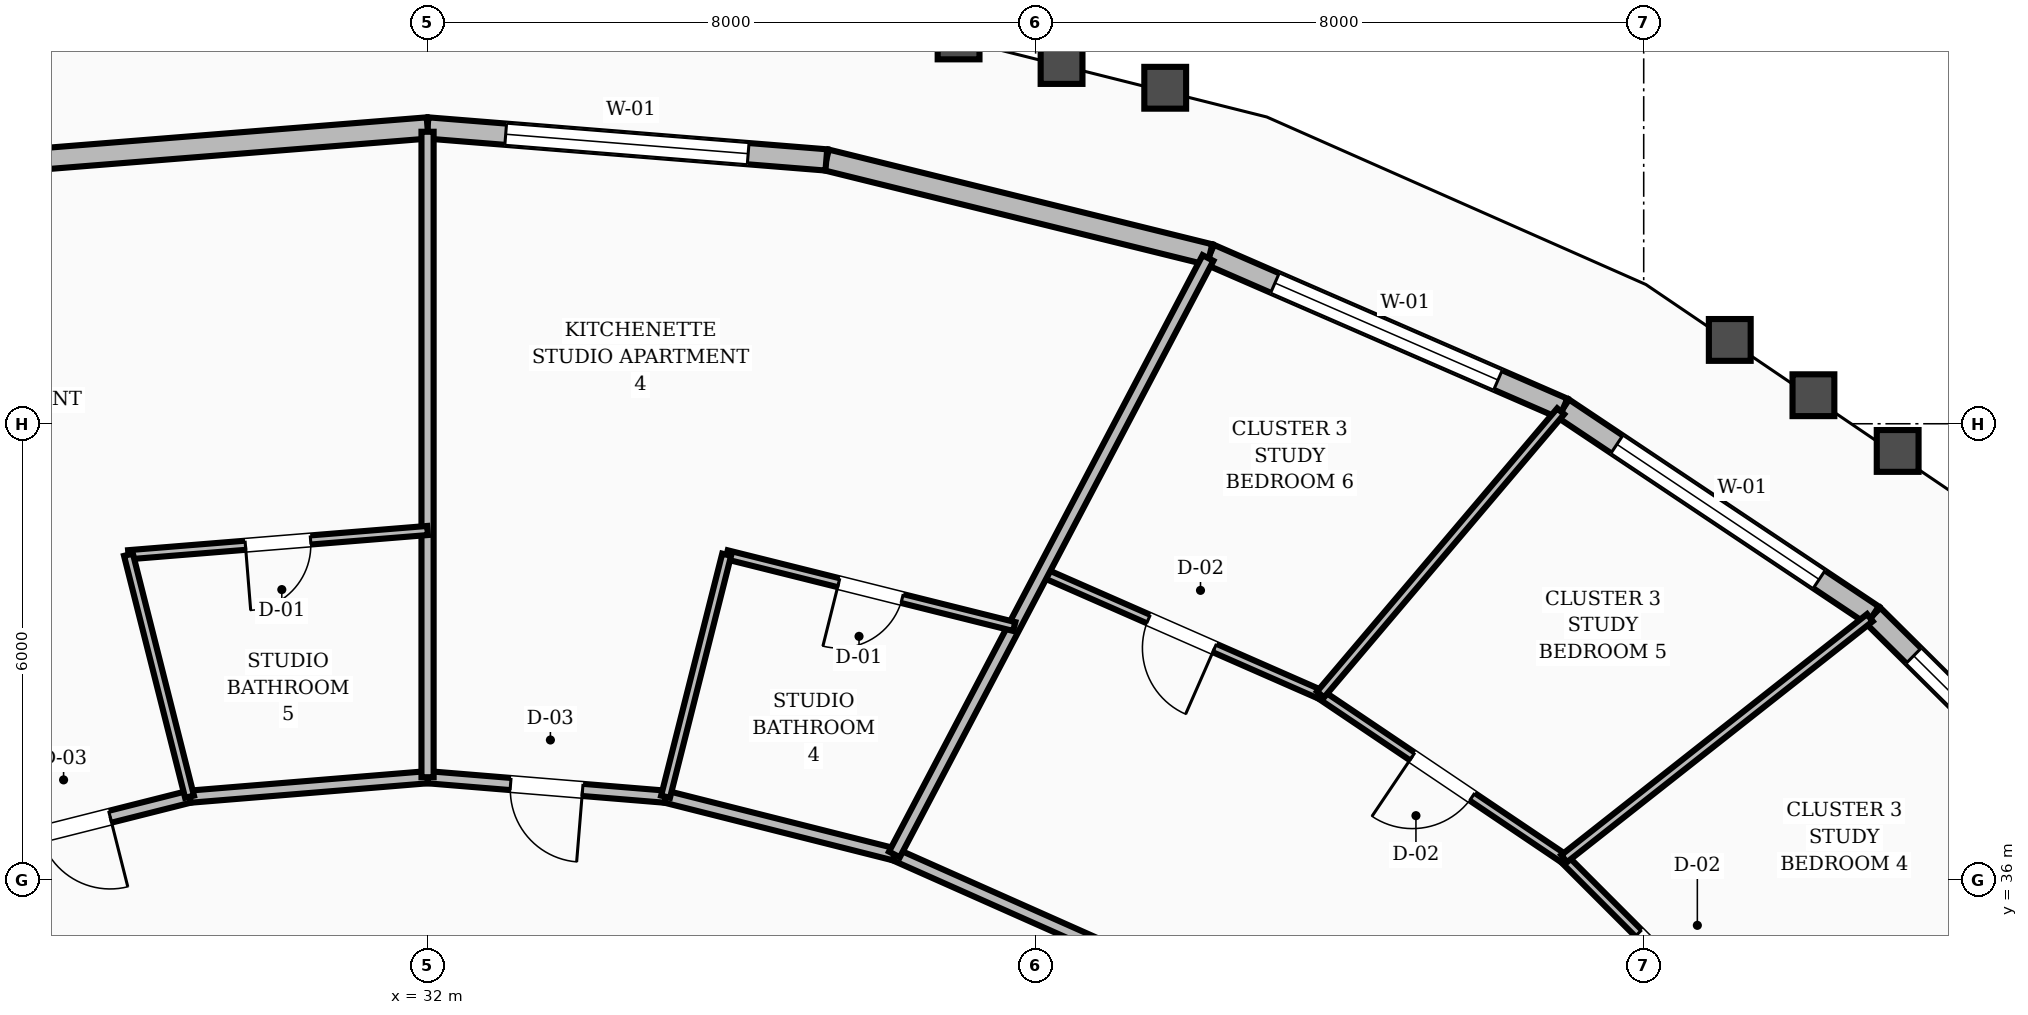
"""IFC4 building model, lengths in metres.
Left out: names, types, materials, properties, quantities, classifications, styles, units other than length and angle.
Written with IfcOpenShell. Run it as: python <this file> out.ifc"""

import sys

from ifc_helpers import new_model, si_unit, direction, frame, frame_2d, origin, place, context, subcontext, project, spatial, rectangle, extrude, element, fill, save


model = new_model("IFC4")
c1 = context("Model", 3, precision=1e-05, world=origin(), true_north=direction((0.0, 1.0)))
c2 = subcontext(c1, "Body", "Model", "MODEL_VIEW")
j1 = project(units=[si_unit("LENGTHUNIT", "METRE"), si_unit("PLANEANGLEUNIT", "RADIAN")], contexts=[c1])
p1 = place(None, origin())
s1 = spatial("IfcSite", under=j1, at=p1, CompositionType="ELEMENT")
p2 = place(p1, origin())
s2 = spatial("IfcBuilding", under=s1, at=p2, CompositionType="ELEMENT")
p3 = place(p2, frame((0.0, 0.0, 66.4)))
s3 = spatial("IfcBuildingStorey", under=s2, at=p3, CompositionType="ELEMENT", Elevation=66.4)
p4 = place(p3, frame((54.36, 36.162, 0.0), z_axis=(0.0, 0.0, 1.0), x_axis=(-0.710003239363, 0.704198409608, 0.0)))
e1 = element("IfcWall", 1, at=p4, inside=s3, PredefinedType="STANDARD", context=c2, shape_type="SweptSolid", body=[
    extrude(rectangle(XDim=4.71, YDim=0.28, at=frame_2d((2.355, 0.0))), origin(), (0.0, 0.0, 1.0), 2.71),
])
p5 = place(p4, frame((0.755, 0.0, 0.8)))
e2 = element("IfcOpeningElement", 2, at=p5, cuts=e1, PredefinedType="OPENING", context=c2, shape_type="SweptSolid", body=[
    extrude(rectangle(XDim=3.2, YDim=1.65, at=frame_2d((1.6, 0.825))), frame((0.0, 0.15, 0.0), z_axis=(0.0, -1.0, 0.0), x_axis=(1.0, 0.0, 0.0)), (0.0, 0.0, 1.0), 0.3),
])
p6 = place(p3, frame((51.015, 39.479, 0.0), z_axis=(0.0, 0.0, 1.0), x_axis=(-0.83148272081, 0.555550614251, 0.0)))
e3 = element("IfcWall", 3, at=p6, inside=s3, PredefinedType="STANDARD", context=c2, shape_type="SweptSolid", body=[
    extrude(rectangle(XDim=4.901, YDim=0.28, at=frame_2d((2.45, 0.0))), origin(), (0.0, 0.0, 1.0), 2.71),
])
p7 = place(p6, frame((0.85, 0.0, 0.8)))
e4 = element("IfcOpeningElement", 4, at=p7, cuts=e3, PredefinedType="OPENING", context=c2, shape_type="SweptSolid", body=[
    extrude(rectangle(XDim=3.2, YDim=1.65, at=frame_2d((1.6, 0.825))), frame((0.0, 0.15, 0.0), z_axis=(0.0, -1.0, 0.0), x_axis=(1.0, 0.0, 0.0)), (0.0, 0.0, 1.0), 0.3),
])
p8 = place(p3, frame((46.94, 42.202, 0.0), z_axis=(0.0, 0.0, 1.0), x_axis=(-0.916956720631, 0.398986682096, 0.0)))
e5 = element("IfcWall", 5, at=p8, inside=s3, PredefinedType="STANDARD", context=c2, shape_type="SweptSolid", body=[
    extrude(rectangle(XDim=5.07, YDim=0.28, at=frame_2d((2.535, 0.0))), origin(), (0.0, 0.0, 1.0), 2.71),
])
p9 = place(p8, frame((0.935, 0.0, 0.8)))
e6 = element("IfcOpeningElement", 6, at=p9, cuts=e5, PredefinedType="OPENING", context=c2, shape_type="SweptSolid", body=[
    extrude(rectangle(XDim=3.2, YDim=1.65, at=frame_2d((1.6, 0.825))), frame((0.0, 0.15, 0.0), z_axis=(0.0, -1.0, 0.0), x_axis=(1.0, 0.0, 0.0)), (0.0, 0.0, 1.0), 0.3),
])
p10 = place(p3, frame((42.291, 44.225, 0.0), z_axis=(0.0, 0.0, 1.0), x_axis=(-0.970832238087, 0.239759807915, 0.0)))
e7 = element("IfcWall", 7, at=p10, inside=s3, PredefinedType="STANDARD", context=c2, shape_type="SweptSolid", body=[
    extrude(rectangle(XDim=5.196, YDim=0.28, at=frame_2d((2.598, 0.0))), origin(), (0.0, 0.0, 1.0), 2.71),
])
p11 = place(p3, frame((37.246, 45.471, 0.0), z_axis=(0.0, 0.0, 1.0), x_axis=(-0.996800955667, 0.079924056336, 0.0)))
e8 = element("IfcWall", 8, at=p11, inside=s3, PredefinedType="STANDARD", context=c2, shape_type="SweptSolid", body=[
    extrude(rectangle(XDim=5.263, YDim=0.28, at=frame_2d((2.632, 0.0))), origin(), (0.0, 0.0, 1.0), 2.71),
])
p12 = place(p11, frame((1.031, 0.0, 0.8)))
e9 = element("IfcOpeningElement", 9, at=p12, cuts=e8, PredefinedType="OPENING", context=c2, shape_type="SweptSolid", body=[
    extrude(rectangle(XDim=3.2, YDim=1.65, at=frame_2d((1.6, 0.825))), frame((0.0, 0.15, 0.0), z_axis=(0.0, -1.0, 0.0), x_axis=(1.0, 0.0, 0.0)), (0.0, 0.0, 1.0), 0.3),
])
p13 = place(p3, frame((32.0, 45.892, 0.0), z_axis=(0.0, 0.0, 1.0), x_axis=(-0.996800955667, -0.079924056336, 0.0)))
e10 = element("IfcWall", 10, at=p13, inside=s3, PredefinedType="STANDARD", context=c2, shape_type="SweptSolid", body=[
    extrude(rectangle(XDim=5.263, YDim=0.28, at=frame_2d((2.632, 0.0))), origin(), (0.0, 0.0, 1.0), 2.71),
])
p14 = place(p3, frame((40.917, 35.1, 0.0), z_axis=(0.0, 0.0, 1.0), x_axis=(-0.913768445178, 0.406235434936, 0.0)))
e11 = element("IfcWall", 11, at=p14, inside=s3, PredefinedType="SOLIDWALL", context=c2, shape_type="SweptSolid", body=[
    extrude(rectangle(XDim=3.037, YDim=0.16, at=frame_2d((1.519, 0.0))), origin(), (0.0, 0.0, 1.0), 2.71),
])
p15 = place(p3, frame((38.142, 36.334, 0.0), z_axis=(0.0, 0.0, 1.0), x_axis=(-0.969608333194, 0.244662380029, 0.0)))
e12 = element("IfcWall", 12, at=p15, inside=s3, PredefinedType="SOLIDWALL", context=c2, shape_type="SweptSolid", body=[
    extrude(rectangle(XDim=3.105, YDim=0.16, at=frame_2d((1.553, 0.0))), origin(), (0.0, 0.0, 1.0), 2.71),
])
p16 = place(p3, frame((35.131, 37.094, 0.0), z_axis=(0.0, 0.0, 1.0), x_axis=(-0.996658973252, 0.081675522876, 0.0)))
e13 = element("IfcWall", 13, at=p16, inside=s3, PredefinedType="SOLIDWALL", context=c2, shape_type="SweptSolid", body=[
    extrude(rectangle(XDim=3.142, YDim=0.16, at=frame_2d((1.571, 0.0))), origin(), (0.0, 0.0, 1.0), 2.71),
])
p17 = place(p16, frame((1.096, 0.0, 0.0)))
e14 = element("IfcOpeningElement", 14, at=p17, cuts=e13, PredefinedType="OPENING", context=c2, shape_type="SweptSolid", body=[
    extrude(rectangle(XDim=0.95, YDim=2.1, at=frame_2d((0.475, 1.05))), frame((0.0, 0.09, 0.0), z_axis=(0.0, -1.0, 0.0), x_axis=(1.0, 0.0, 0.0)), (0.0, 0.0, 1.0), 0.18),
])
p18 = place(p3, frame((32.0, 37.35, 0.0), z_axis=(0.0, 0.0, 1.0), x_axis=(-0.996658973252, -0.081675522876, 0.0)))
e15 = element("IfcWall", 15, at=p18, inside=s3, PredefinedType="SOLIDWALL", context=c2, shape_type="SweptSolid", body=[
    extrude(rectangle(XDim=3.142, YDim=0.16, at=frame_2d((1.571, 0.0))), origin(), (0.0, 0.0, 1.0), 2.71),
])
p19 = place(p3, frame((28.869, 37.094, 0.0), z_axis=(0.0, 0.0, 1.0), x_axis=(-0.969608333194, -0.244662380029, 0.0)))
e16 = element("IfcWall", 16, at=p19, inside=s3, PredefinedType="SOLIDWALL", context=c2, shape_type="SweptSolid", body=[
    extrude(rectangle(XDim=3.105, YDim=0.16, at=frame_2d((1.553, 0.0))), origin(), (0.0, 0.0, 1.0), 2.71),
])
p20 = place(p19, frame((1.078, 0.0, 0.0)))
e17 = element("IfcOpeningElement", 17, at=p20, cuts=e16, PredefinedType="OPENING", context=c2, shape_type="SweptSolid", body=[
    extrude(rectangle(XDim=0.95, YDim=2.1, at=frame_2d((0.475, 1.05))), frame((0.0, 0.09, 0.0), z_axis=(0.0, -1.0, 0.0), x_axis=(1.0, 0.0, 0.0)), (0.0, 0.0, 1.0), 0.18),
])
p21 = place(p3, frame((49.582, 33.647, 0.0), z_axis=(0.0, 0.0, 1.0), x_axis=(-0.706877046575, 0.707336441183, 0.0)))
e18 = element("IfcWall", 18, at=p21, inside=s3, PredefinedType="PARTITIONING", context=c2, shape_type="SweptSolid", body=[
    extrude(rectangle(XDim=3.72, YDim=0.12, at=frame_2d((1.86, 0.0))), origin(), (0.0, 0.0, 1.0), 2.71),
])
p22 = place(p21, frame((1.385, 0.0, 0.0)))
e19 = element("IfcOpeningElement", 19, at=p22, cuts=e18, PredefinedType="OPENING", context=c2, shape_type="SweptSolid", body=[
    extrude(rectangle(XDim=0.95, YDim=2.1, at=frame_2d((0.475, 1.05))), frame((0.0, 0.07, 0.0), z_axis=(0.0, -1.0, 0.0), x_axis=(1.0, 0.0, 0.0)), (0.0, 0.0, 1.0), 0.14),
])
p23 = place(p3, frame((49.582, 33.647, 0.0), z_axis=(0.0, 0.0, 1.0), x_axis=(0.884884558716, 0.465810388191, 0.0)))
e20 = element("IfcWall", 20, at=p23, inside=s3, PredefinedType="PARTITIONING", context=c2, shape_type="SweptSolid", body=[
    extrude(rectangle(XDim=5.349, YDim=0.12, at=frame_2d((2.675, 0.0))), origin(), (0.0, 0.0, 1.0), 2.71),
])
p24 = place(p3, frame((46.952, 36.279, 0.0), z_axis=(0.0, 0.0, 1.0), x_axis=(-0.829269610314, 0.558848739293, 0.0)))
e21 = element("IfcWall", 21, at=p24, inside=s3, PredefinedType="PARTITIONING", context=c2, shape_type="SweptSolid", body=[
    extrude(rectangle(XDim=3.864, YDim=0.12, at=frame_2d((1.932, 0.0))), origin(), (0.0, 0.0, 1.0), 2.71),
])
p25 = place(p24, frame((1.457, 0.0, 0.0)))
e22 = element("IfcOpeningElement", 22, at=p25, cuts=e21, PredefinedType="OPENING", context=c2, shape_type="SweptSolid", body=[
    extrude(rectangle(XDim=0.95, YDim=2.1, at=frame_2d((0.475, 1.05))), frame((0.0, 0.07, 0.0), z_axis=(0.0, -1.0, 0.0), x_axis=(1.0, 0.0, 0.0)), (0.0, 0.0, 1.0), 0.14),
])
p26 = place(p3, frame((46.952, 36.279, 0.0), z_axis=(0.0, 0.0, 1.0), x_axis=(0.785492374308, 0.618871335501, 0.0)))
e23 = element("IfcWall", 23, at=p26, inside=s3, PredefinedType="PARTITIONING", context=c2, shape_type="SweptSolid", body=[
    extrude(rectangle(XDim=5.123, YDim=0.12, at=frame_2d((2.561, 0.0))), origin(), (0.0, 0.0, 1.0), 2.71),
])
p27 = place(p3, frame((43.748, 38.438, 0.0), z_axis=(0.0, 0.0, 1.0), x_axis=(-0.915665439142, 0.401941293674, 0.0)))
e24 = element("IfcWall", 24, at=p27, inside=s3, PredefinedType="PARTITIONING", context=c2, shape_type="SweptSolid", body=[
    extrude(rectangle(XDim=3.992, YDim=0.12, at=frame_2d((1.996, 0.0))), origin(), (0.0, 0.0, 1.0), 2.71),
])
p28 = place(p27, frame((1.521, 0.0, 0.0)))
e25 = element("IfcOpeningElement", 25, at=p28, cuts=e24, PredefinedType="OPENING", context=c2, shape_type="SweptSolid", body=[
    extrude(rectangle(XDim=0.95, YDim=2.1, at=frame_2d((0.475, 1.05))), frame((0.0, 0.07, 0.0), z_axis=(0.0, -1.0, 0.0), x_axis=(1.0, 0.0, 0.0)), (0.0, 0.0, 1.0), 0.14),
])
p29 = place(p3, frame((43.748, 38.438, 0.0), z_axis=(0.0, 0.0, 1.0), x_axis=(0.646786371391, 0.762671219978, 0.0)))
e26 = element("IfcWall", 26, at=p29, inside=s3, PredefinedType="PARTITIONING", context=c2, shape_type="SweptSolid", body=[
    extrude(rectangle(XDim=4.885, YDim=0.12, at=frame_2d((2.443, 0.0))), origin(), (0.0, 0.0, 1.0), 2.71),
])
p30 = place(p3, frame((38.142, 36.334, 0.0), z_axis=(0.0, 0.0, 1.0), x_axis=(0.465340061266, 0.885131983029, 0.0)))
e27 = element("IfcWall", 27, at=p30, inside=s3, PredefinedType="SOLIDWALL", context=c2, shape_type="SweptSolid", body=[
    extrude(rectangle(XDim=8.865, YDim=0.16, at=frame_2d((4.433, 0.0))), origin(), (0.0, 0.0, 1.0), 2.71),
])
p31 = place(p3, frame((39.719, 39.333, 0.0), z_axis=(0.0, 0.0, 1.0), x_axis=(-0.970238171978, 0.242152616416, 0.0)))
e28 = element("IfcWall", 28, at=p31, inside=s3, PredefinedType="PARTITIONING", context=c2, shape_type="SweptSolid", body=[
    extrude(rectangle(XDim=3.9, YDim=0.12, at=frame_2d((1.95, 0.0))), origin(), (0.0, 0.0, 1.0), 2.71),
])
p32 = place(p31, frame((1.52, 0.0, 0.0)))
e29 = element("IfcOpeningElement", 29, at=p32, cuts=e28, PredefinedType="OPENING", context=c2, shape_type="SweptSolid", body=[
    extrude(rectangle(XDim=0.86, YDim=2.1, at=frame_2d((0.43, 1.05))), frame((0.0, 0.07, 0.0), z_axis=(0.0, -1.0, 0.0), x_axis=(1.0, 0.0, 0.0)), (0.0, 0.0, 1.0), 0.14),
])
p33 = place(p3, frame((35.131, 37.094, 0.0), z_axis=(0.0, 0.0, 1.0), x_axis=(0.24479200307, 0.969575616047, 0.0)))
e30 = element("IfcWall", 30, at=p33, inside=s3, PredefinedType="PARTITIONING", context=c2, shape_type="SweptSolid", body=[
    extrude(rectangle(XDim=3.283, YDim=0.12, at=frame_2d((1.642, 0.0))), origin(), (0.0, 0.0, 1.0), 2.71),
])
p34 = place(p3, frame((32.0, 37.35, 0.0), z_axis=(0.0, 0.0, 1.0), x_axis=(0.0, 1.0, 0.0)))
e31 = element("IfcWall", 31, at=p34, inside=s3, PredefinedType="SOLIDWALL", context=c2, shape_type="SweptSolid", body=[
    extrude(rectangle(XDim=8.491, YDim=0.16, at=frame_2d((4.246, 0.0))), origin(), (0.0, 0.0, 1.0), 2.71),
])
p35 = place(p3, frame((32.0, 40.596, 0.0), z_axis=(0.0, 0.0, 1.0), x_axis=(-0.996732951444, -0.080767713258, 0.0)))
e32 = element("IfcWall", 32, at=p35, inside=s3, PredefinedType="PARTITIONING", context=c2, shape_type="SweptSolid", body=[
    extrude(rectangle(XDim=3.948, YDim=0.12, at=frame_2d((1.974, 0.0))), origin(), (0.0, 0.0, 1.0), 2.71),
])
p36 = place(p35, frame((1.544, 0.0, 0.0)))
e33 = element("IfcOpeningElement", 33, at=p36, cuts=e32, PredefinedType="OPENING", context=c2, shape_type="SweptSolid", body=[
    extrude(rectangle(XDim=0.86, YDim=2.1, at=frame_2d((0.43, 1.05))), frame((0.0, 0.07, 0.0), z_axis=(0.0, -1.0, 0.0), x_axis=(1.0, 0.0, 0.0)), (0.0, 0.0, 1.0), 0.14),
])
p37 = place(p3, frame((28.869, 37.094, 0.0), z_axis=(0.0, 0.0, 1.0), x_axis=(-0.24479200307, 0.969575616047, 0.0)))
e34 = element("IfcWall", 34, at=p37, inside=s3, PredefinedType="PARTITIONING", context=c2, shape_type="SweptSolid", body=[
    extrude(rectangle(XDim=3.283, YDim=0.12, at=frame_2d((1.642, 0.0))), origin(), (0.0, 0.0, 1.0), 2.71),
])
p38 = place(p5, origin())
e35 = element("IfcWindow", 35, at=p38, inside=s3, PartitioningType="SINGLE_PANEL", PredefinedType="WINDOW", context=c2, shape_type="SweptSolid", body=[
    extrude(rectangle(XDim=3.2, YDim=1.65, at=frame_2d((1.6, 0.825))), frame((0.0, 0.03, 0.0), z_axis=(0.0, -1.0, 0.0), x_axis=(1.0, 0.0, 0.0)), (0.0, 0.0, 1.0), 0.06),
])
fill(e2, e35)
p39 = place(p7, origin())
e36 = element("IfcWindow", 36, at=p39, inside=s3, PartitioningType="SINGLE_PANEL", PredefinedType="WINDOW", context=c2, shape_type="SweptSolid", body=[
    extrude(rectangle(XDim=3.2, YDim=1.65, at=frame_2d((1.6, 0.825))), frame((0.0, 0.03, 0.0), z_axis=(0.0, -1.0, 0.0), x_axis=(1.0, 0.0, 0.0)), (0.0, 0.0, 1.0), 0.06),
])
fill(e4, e36)
p40 = place(p9, origin())
e37 = element("IfcWindow", 37, at=p40, inside=s3, PartitioningType="SINGLE_PANEL", PredefinedType="WINDOW", context=c2, shape_type="SweptSolid", body=[
    extrude(rectangle(XDim=3.2, YDim=1.65, at=frame_2d((1.6, 0.825))), frame((0.0, 0.03, 0.0), z_axis=(0.0, -1.0, 0.0), x_axis=(1.0, 0.0, 0.0)), (0.0, 0.0, 1.0), 0.06),
])
fill(e6, e37)
p41 = place(p12, origin())
e38 = element("IfcWindow", 38, at=p41, inside=s3, PartitioningType="SINGLE_PANEL", PredefinedType="WINDOW", context=c2, shape_type="SweptSolid", body=[
    extrude(rectangle(XDim=3.2, YDim=1.65, at=frame_2d((1.6, 0.825))), frame((0.0, 0.03, 0.0), z_axis=(0.0, -1.0, 0.0), x_axis=(1.0, 0.0, 0.0)), (0.0, 0.0, 1.0), 0.06),
])
fill(e9, e38)
p42 = place(p22, origin())
e39 = element("IfcDoor", 39, at=p42, inside=s3, OperationType="SINGLE_SWING_LEFT", PredefinedType="DOOR", context=c2, shape_type="SweptSolid", body=[
    extrude(rectangle(XDim=0.95, YDim=2.1, at=frame_2d((0.475, 1.05))), frame((0.0, 0.025, 0.0), z_axis=(0.0, -1.0, 0.0), x_axis=(1.0, 0.0, 0.0)), (0.0, 0.0, 1.0), 0.05),
])
fill(e19, e39)
p43 = place(p25, origin())
e40 = element("IfcDoor", 40, at=p43, inside=s3, OperationType="SINGLE_SWING_RIGHT", PredefinedType="DOOR", context=c2, shape_type="SweptSolid", body=[
    extrude(rectangle(XDim=0.95, YDim=2.1, at=frame_2d((0.475, 1.05))), frame((0.0, 0.025, 0.0), z_axis=(0.0, -1.0, 0.0), x_axis=(1.0, 0.0, 0.0)), (0.0, 0.0, 1.0), 0.05),
])
fill(e22, e40)
p44 = place(p28, origin())
e41 = element("IfcDoor", 41, at=p44, inside=s3, OperationType="SINGLE_SWING_LEFT", PredefinedType="DOOR", context=c2, shape_type="SweptSolid", body=[
    extrude(rectangle(XDim=0.95, YDim=2.1, at=frame_2d((0.475, 1.05))), frame((0.0, 0.025, 0.0), z_axis=(0.0, -1.0, 0.0), x_axis=(1.0, 0.0, 0.0)), (0.0, 0.0, 1.0), 0.05),
])
fill(e25, e41)
p45 = place(p32, origin())
e42 = element("IfcDoor", 42, at=p45, inside=s3, OperationType="SINGLE_SWING_RIGHT", PredefinedType="DOOR", context=c2, shape_type="SweptSolid", body=[
    extrude(rectangle(XDim=0.86, YDim=2.1, at=frame_2d((0.43, 1.05))), frame((0.0, 0.025, 0.0), z_axis=(0.0, -1.0, 0.0), x_axis=(1.0, 0.0, 0.0)), (0.0, 0.0, 1.0), 0.05),
])
fill(e29, e42)
p46 = place(p17, origin())
e43 = element("IfcDoor", 43, at=p46, inside=s3, OperationType="SINGLE_SWING_LEFT", PredefinedType="DOOR", context=c2, shape_type="SweptSolid", body=[
    extrude(rectangle(XDim=0.95, YDim=2.1, at=frame_2d((0.475, 1.05))), frame((0.0, 0.025, 0.0), z_axis=(0.0, -1.0, 0.0), x_axis=(1.0, 0.0, 0.0)), (0.0, 0.0, 1.0), 0.05),
])
fill(e14, e43)
p47 = place(p36, origin())
e44 = element("IfcDoor", 44, at=p47, inside=s3, OperationType="SINGLE_SWING_RIGHT", PredefinedType="DOOR", context=c2, shape_type="SweptSolid", body=[
    extrude(rectangle(XDim=0.86, YDim=2.1, at=frame_2d((0.43, 1.05))), frame((0.0, 0.025, 0.0), z_axis=(0.0, -1.0, 0.0), x_axis=(1.0, 0.0, 0.0)), (0.0, 0.0, 1.0), 0.05),
])
fill(e33, e44)
p48 = place(p20, origin())
e45 = element("IfcDoor", 45, at=p48, inside=s3, OperationType="SINGLE_SWING_LEFT", PredefinedType="DOOR", context=c2, shape_type="SweptSolid", body=[
    extrude(rectangle(XDim=0.95, YDim=2.1, at=frame_2d((0.475, 1.05))), frame((0.0, 0.025, 0.0), z_axis=(0.0, -1.0, 0.0), x_axis=(1.0, 0.0, 0.0)), (0.0, 0.0, 1.0), 0.05),
])
fill(e17, e45)
save(model, sys.argv[1])
